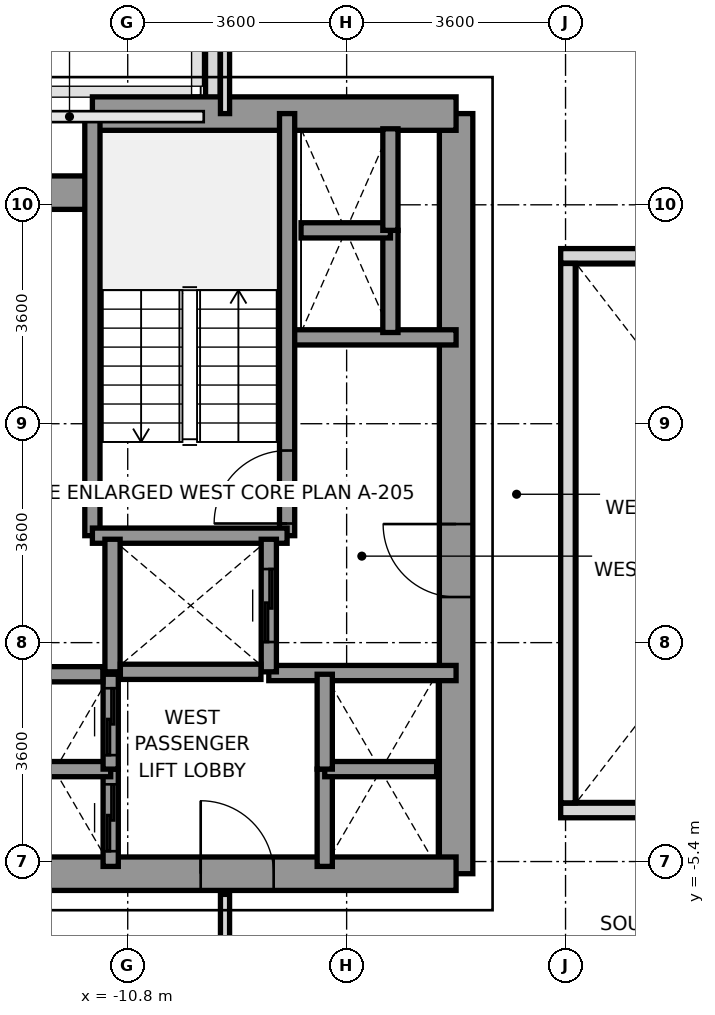
"""IFC4 building model, lengths in metres.
Left out: names, types, materials, properties, quantities, classifications, styles, units other than length and angle.
Written with IfcOpenShell. Run it as: python <this file> out.ifc"""

import sys

from ifc_helpers import new_model, si_unit, direction, frame, frame_2d, origin, place, context, subcontext, project, spatial, rectangle, extrude, source, transform, mapped, element, fill, save


model = new_model("IFC4")
c1 = context("Model", 3, precision=1e-05, world=origin(), true_north=direction((0.0, 1.0)))
c2 = subcontext(c1, "Body", "Model", "MODEL_VIEW")
j1 = project(units=[si_unit("LENGTHUNIT", "METRE"), si_unit("PLANEANGLEUNIT", "RADIAN")], contexts=[c1])
p1 = place(None, origin())
s1 = spatial("IfcSite", under=j1, at=p1, CompositionType="ELEMENT")
p2 = place(p1, origin())
s2 = spatial("IfcBuilding", under=s1, at=p2, CompositionType="ELEMENT")
p3 = place(p2, frame((0.0, 0.0, 61.2)))
s3 = spatial("IfcBuildingStorey", under=s2, at=p3, CompositionType="ELEMENT", Elevation=61.2)
p4 = place(p3, frame((-9.4, 6.953, 0.0), z_axis=(0.0, 0.0, 1.0), x_axis=(0.0, 1.0, 0.0)))
e1 = element("IfcWall", 1, at=p4, inside=s3, PredefinedType="PARAPET", context=c2, shape_type="SweptSolid", body=[
    extrude(rectangle(XDim=1.444, YDim=0.24, at=frame_2d((0.722, 0.0))), origin(), (0.0, 0.0, 1.0), 1.15),
])
p5 = place(p3, frame((-5.4, -5.6, 0.0), z_axis=(0.0, 0.0, 1.0), x_axis=(0.0, 1.0, 0.0)))
e2 = element("IfcWall", 2, at=p5, inside=s3, PredefinedType="SHEAR", context=c2, shape_type="SweptSolid", body=[
    extrude(rectangle(XDim=12.5, YDim=0.55, at=frame_2d((6.25, 0.0))), origin(), (0.0, 0.0, 1.0), 3.2),
])
p6 = place(p5, frame((4.55, 0.0, 0.0)))
e3 = element("IfcOpeningElement", 3, at=p6, cuts=e2, PredefinedType="OPENING", context=c2, shape_type="SweptSolid", body=[
    extrude(rectangle(XDim=1.2, YDim=2.2, at=frame_2d((0.6, 1.1))), frame((0.0, 0.285, 0.0), z_axis=(0.0, -1.0, 0.0), x_axis=(1.0, 0.0, 0.0)), (0.0, 0.0, 1.0), 0.57),
])
p7 = place(p3, frame((-11.381, 6.9, 0.0), z_axis=(0.0, 0.0, 1.0), x_axis=(1.0, 0.0, 0.0)))
e4 = element("IfcWall", 4, at=p7, inside=s3, PredefinedType="SHEAR", context=c2, shape_type="SweptSolid", body=[
    extrude(rectangle(XDim=5.981, YDim=0.55, at=frame_2d((2.991, 0.0))), origin(), (0.0, 0.0, 1.0), 3.2),
])
p8 = place(p3, frame((-13.2, 5.6, 0.0), z_axis=(0.0, 0.0, 1.0), x_axis=(1.0, 0.0, 0.0)))
e5 = element("IfcWall", 5, at=p8, inside=s3, PredefinedType="SHEAR", context=c2, shape_type="SweptSolid", body=[
    extrude(rectangle(XDim=1.819, YDim=0.55, at=frame_2d((0.909, 0.0))), origin(), (0.0, 0.0, 1.0), 3.2),
])
p9 = place(p3, frame((-13.2, -5.6, 0.0), z_axis=(0.0, 0.0, 1.0), x_axis=(1.0, 0.0, 0.0)))
e6 = element("IfcWall", 6, at=p9, inside=s3, PredefinedType="SHEAR", context=c2, shape_type="SweptSolid", body=[
    extrude(rectangle(XDim=7.8, YDim=0.55, at=frame_2d((3.9, 0.0))), origin(), (0.0, 0.0, 1.0), 3.2),
])
p10 = place(p9, frame((3.6, 0.0, 0.0)))
e7 = element("IfcOpeningElement", 7, at=p10, cuts=e6, PredefinedType="OPENING", context=c2, shape_type="SweptSolid", body=[
    extrude(rectangle(XDim=1.2, YDim=2.2, at=frame_2d((0.6, 1.1))), frame((0.0, 0.285, 0.0), z_axis=(0.0, -1.0, 0.0), x_axis=(1.0, 0.0, 0.0)), (0.0, 0.0, 1.0), 0.57),
])
p11 = place(p3, frame((-8.18, 3.22, 0.0), z_axis=(0.0, 0.0, 1.0), x_axis=(1.0, 0.0, 0.0)))
e8 = element("IfcWall", 8, at=p11, inside=s3, PredefinedType="SOLIDWALL", context=c2, shape_type="SweptSolid", body=[
    extrude(rectangle(XDim=2.78, YDim=0.25, at=frame_2d((1.39, 0.0))), origin(), (0.0, 0.0, 1.0), 3.2),
])
p12 = place(p3, frame((-8.48, -2.3, 0.0), z_axis=(0.0, 0.0, 1.0), x_axis=(1.0, 0.0, 0.0)))
e9 = element("IfcWall", 9, at=p12, inside=s3, PredefinedType="SOLIDWALL", context=c2, shape_type="SweptSolid", body=[
    extrude(rectangle(XDim=3.08, YDim=0.25, at=frame_2d((1.54, 0.0))), origin(), (0.0, 0.0, 1.0), 3.2),
])
p13 = place(p3, frame((-8.179, -0.041, 0.0), z_axis=(0.0, 0.0, 1.0), x_axis=(0.0, 1.0, 0.0)))
e10 = element("IfcWall", 10, at=p13, inside=s3, PredefinedType="SOLIDWALL", context=c2, shape_type="SweptSolid", body=[
    extrude(rectangle(XDim=6.941, YDim=0.25, at=frame_2d((3.47, 0.0))), origin(), (0.0, 0.0, 1.0), 3.2),
])
p14 = place(p13, frame((0.2, 0.0, 0.0)))
e11 = element("IfcOpeningElement", 11, at=p14, cuts=e10, PredefinedType="OPENING", context=c2, shape_type="SweptSolid", body=[
    extrude(rectangle(XDim=1.2, YDim=2.2, at=frame_2d((0.6, 1.1))), frame((0.0, 0.135, 0.0), z_axis=(0.0, -1.0, 0.0), x_axis=(1.0, 0.0, 0.0)), (0.0, 0.0, 1.0), 0.27),
])
p15 = place(p3, frame((-11.381, -0.041, 0.0), z_axis=(0.0, 0.0, 1.0), x_axis=(0.0, 1.0, 0.0)))
e12 = element("IfcWall", 12, at=p15, inside=s3, PredefinedType="SOLIDWALL", context=c2, shape_type="SweptSolid", body=[
    extrude(rectangle(XDim=6.941, YDim=0.25, at=frame_2d((3.47, 0.0))), origin(), (0.0, 0.0, 1.0), 3.2),
])
p16 = place(p3, frame((-11.381, -0.041, 0.0), z_axis=(0.0, 0.0, 1.0), x_axis=(1.0, 0.0, 0.0)))
e13 = element("IfcWall", 13, at=p16, inside=s3, PredefinedType="SOLIDWALL", context=c2, shape_type="SweptSolid", body=[
    extrude(rectangle(XDim=3.202, YDim=0.25, at=frame_2d((1.601, 0.0))), origin(), (0.0, 0.0, 1.0), 3.2),
])
p17 = place(p3, frame((-11.05, -2.28, 0.0), z_axis=(0.0, 0.0, 1.0), x_axis=(0.0, 1.0, 0.0)))
e14 = element("IfcWall", 14, at=p17, inside=s3, PredefinedType="SOLIDWALL", context=c2, shape_type="SweptSolid", body=[
    extrude(rectangle(XDim=2.18, YDim=0.25, at=frame_2d((1.09, 0.0))), origin(), (0.0, 0.0, 1.0), 3.2),
])
p18 = place(p3, frame((-8.48, -2.28, 0.0), z_axis=(0.0, 0.0, 1.0), x_axis=(0.0, 1.0, 0.0)))
e15 = element("IfcWall", 15, at=p18, inside=s3, PredefinedType="SOLIDWALL", context=c2, shape_type="SweptSolid", body=[
    extrude(rectangle(XDim=2.18, YDim=0.25, at=frame_2d((1.09, 0.0))), origin(), (0.0, 0.0, 1.0), 3.2),
])
p19 = place(p18, frame((0.49, 0.0, 0.0)))
e16 = element("IfcOpeningElement", 16, at=p19, cuts=e15, PredefinedType="OPENING", context=c2, shape_type="SweptSolid", body=[
    extrude(rectangle(XDim=1.2, YDim=2.2, at=frame_2d((0.6, 1.1))), frame((0.0, 0.135, 0.0), z_axis=(0.0, -1.0, 0.0), x_axis=(1.0, 0.0, 0.0)), (0.0, 0.0, 1.0), 0.27),
])
p20 = place(p3, frame((-10.921, -2.28, 0.0), z_axis=(0.0, 0.0, 1.0), x_axis=(1.0, 0.0, 0.0)))
e17 = element("IfcWall", 17, at=p20, inside=s3, PredefinedType="SOLIDWALL", context=c2, shape_type="SweptSolid", body=[
    extrude(rectangle(XDim=2.312, YDim=0.25, at=frame_2d((1.156, 0.0))), origin(), (0.0, 0.0, 1.0), 3.2),
])
p21 = place(p3, frame((-11.08, -5.48, 0.0), z_axis=(0.0, 0.0, 1.0), x_axis=(0.0, 1.0, 0.0)))
e18 = element("IfcWall", 18, at=p21, inside=s3, PredefinedType="SOLIDWALL", context=c2, shape_type="SweptSolid", body=[
    extrude(rectangle(XDim=1.6, YDim=0.25, at=frame_2d((0.8, 0.0))), origin(), (0.0, 0.0, 1.0), 3.2),
])
p22 = place(p21, frame((0.25, 0.0, 0.0)))
e19 = element("IfcOpeningElement", 19, at=p22, cuts=e18, PredefinedType="OPENING", context=c2, shape_type="SweptSolid", body=[
    extrude(rectangle(XDim=1.1, YDim=2.2, at=frame_2d((0.55, 1.1))), frame((0.0, 0.135, 0.0), z_axis=(0.0, -1.0, 0.0), x_axis=(1.0, 0.0, 0.0)), (0.0, 0.0, 1.0), 0.27),
])
p23 = place(p3, frame((-12.92, -3.88, 0.0), z_axis=(0.0, 0.0, 1.0), x_axis=(1.0, 0.0, 0.0)))
e20 = element("IfcWall", 20, at=p23, inside=s3, PredefinedType="SOLIDWALL", context=c2, shape_type="SweptSolid", body=[
    extrude(rectangle(XDim=1.84, YDim=0.25, at=frame_2d((0.92, 0.0))), origin(), (0.0, 0.0, 1.0), 3.2),
])
p24 = place(p3, frame((-11.08, -3.88, 0.0), z_axis=(0.0, 0.0, 1.0), x_axis=(0.0, 1.0, 0.0)))
e21 = element("IfcWall", 21, at=p24, inside=s3, PredefinedType="SOLIDWALL", context=c2, shape_type="SweptSolid", body=[
    extrude(rectangle(XDim=1.56, YDim=0.25, at=frame_2d((0.78, 0.0))), origin(), (0.0, 0.0, 1.0), 3.2),
])
p25 = place(p24, frame((0.23, 0.0, 0.0)))
e22 = element("IfcOpeningElement", 22, at=p25, cuts=e21, PredefinedType="OPENING", context=c2, shape_type="SweptSolid", body=[
    extrude(rectangle(XDim=1.1, YDim=2.2, at=frame_2d((0.55, 1.1))), frame((0.0, 0.135, 0.0), z_axis=(0.0, -1.0, 0.0), x_axis=(1.0, 0.0, 0.0)), (0.0, 0.0, 1.0), 0.27),
])
p26 = place(p3, frame((-12.791, -2.32, 0.0), z_axis=(0.0, 0.0, 1.0), x_axis=(1.0, 0.0, 0.0)))
e23 = element("IfcWall", 23, at=p26, inside=s3, PredefinedType="SOLIDWALL", context=c2, shape_type="SweptSolid", body=[
    extrude(rectangle(XDim=1.582, YDim=0.25, at=frame_2d((0.791, 0.0))), origin(), (0.0, 0.0, 1.0), 3.2),
])
p27 = place(p3, frame((-7.56, -5.48, 0.0), z_axis=(0.0, 0.0, 1.0), x_axis=(0.0, 1.0, 0.0)))
e24 = element("IfcWall", 24, at=p27, inside=s3, PredefinedType="SOLIDWALL", context=c2, shape_type="SweptSolid", body=[
    extrude(rectangle(XDim=1.6, YDim=0.25, at=frame_2d((0.8, 0.0))), origin(), (0.0, 0.0, 1.0), 3.2),
])
p28 = place(p3, frame((-7.56, -3.88, 0.0), z_axis=(0.0, 0.0, 1.0), x_axis=(1.0, 0.0, 0.0)))
e25 = element("IfcWall", 25, at=p28, inside=s3, PredefinedType="SOLIDWALL", context=c2, shape_type="SweptSolid", body=[
    extrude(rectangle(XDim=1.84, YDim=0.25, at=frame_2d((0.92, 0.0))), origin(), (0.0, 0.0, 1.0), 3.2),
])
p29 = place(p3, frame((-7.56, -3.88, 0.0), z_axis=(0.0, 0.0, 1.0), x_axis=(0.0, 1.0, 0.0)))
e26 = element("IfcWall", 26, at=p29, inside=s3, PredefinedType="SOLIDWALL", context=c2, shape_type="SweptSolid", body=[
    extrude(rectangle(XDim=1.56, YDim=0.25, at=frame_2d((0.78, 0.0))), origin(), (0.0, 0.0, 1.0), 3.2),
])
p30 = place(p3, frame((-6.48, 3.3, 0.0), z_axis=(0.0, 0.0, 1.0), x_axis=(0.0, 1.0, 0.0)))
e27 = element("IfcWall", 27, at=p30, inside=s3, PredefinedType="SOLIDWALL", context=c2, shape_type="SweptSolid", body=[
    extrude(rectangle(XDim=1.68, YDim=0.25, at=frame_2d((0.84, 0.0))), origin(), (0.0, 0.0, 1.0), 3.2),
])
p31 = place(p3, frame((-7.95, 4.98, 0.0), z_axis=(0.0, 0.0, 1.0), x_axis=(1.0, 0.0, 0.0)))
e28 = element("IfcWall", 28, at=p31, inside=s3, PredefinedType="SOLIDWALL", context=c2, shape_type="SweptSolid", body=[
    extrude(rectangle(XDim=1.47, YDim=0.25, at=frame_2d((0.735, 0.0))), origin(), (0.0, 0.0, 1.0), 3.2),
])
p32 = place(p3, frame((-6.48, 4.98, 0.0), z_axis=(0.0, 0.0, 1.0), x_axis=(0.0, 1.0, 0.0)))
e29 = element("IfcWall", 29, at=p32, inside=s3, PredefinedType="SOLIDWALL", context=c2, shape_type="SweptSolid", body=[
    extrude(rectangle(XDim=1.67, YDim=0.25, at=frame_2d((0.835, 0.0))), origin(), (0.0, 0.0, 1.0), 3.2),
])
p33 = place(p3, frame((-9.2, 6.9, 0.0), z_axis=(0.0, 0.0, 1.0), x_axis=(0.0, 1.0, 0.0)))
e30 = element("IfcWall", 30, at=p33, inside=s3, PredefinedType="PARTITIONING", context=c2, shape_type="SweptSolid", body=[
    extrude(rectangle(XDim=8.78, YDim=0.15, at=frame_2d((4.39, 0.0))), origin(), (0.0, 0.0, 1.0), 2.71),
])
p34 = place(p3, frame((-9.2, -15.68, 0.0), z_axis=(0.0, 0.0, 1.0), x_axis=(0.0, 1.0, 0.0)))
e31 = element("IfcWall", 31, at=p34, inside=s3, PredefinedType="PARTITIONING", context=c2, shape_type="SweptSolid", body=[
    extrude(rectangle(XDim=9.74, YDim=0.15, at=frame_2d((4.87, 0.0))), origin(), (0.0, 0.0, 1.0), 2.71),
])
for number, where, z_axis, x_axis in (
    (32, (-3.68, -4.56, 0.0), (0.0, 0.0, 1.0), (1.0, 0.0, 0.0)),
    (33, (-3.68, 4.56, 0.0), (0.0, 0.0, 1.0), (1.0, 0.0, 0.0)),
):
    element("IfcWall", number, at=place(p3, frame(where, z_axis=z_axis, x_axis=x_axis)), inside=s3, PredefinedType="PARAPET", context=c2, shape_type="SweptSolid", body=[
        extrude(rectangle(XDim=7.36, YDim=0.24, at=frame_2d((3.68, 0.0))), origin(), (0.0, 0.0, 1.0), 1.15),
    ])
p35 = place(p3, frame((-3.56, -4.435, 0.0), z_axis=(0.0, 0.0, 1.0), x_axis=(0.0, 1.0, 0.0)))
e34 = element("IfcWall", 34, at=p35, inside=s3, PredefinedType="PARAPET", context=c2, shape_type="SweptSolid", body=[
    extrude(rectangle(XDim=8.87, YDim=0.24, at=frame_2d((4.435, 0.0))), origin(), (0.0, 0.0, 1.0), 1.15),
])
m1 = source(origin(), c2, "Body", "SweptSolid", [
    extrude(rectangle(XDim=1.2, YDim=2.2, at=frame_2d((0.6, 1.1))), frame((0.0, 0.025, 0.0), z_axis=(0.0, -1.0, 0.0), x_axis=(1.0, 0.0, 0.0)), (0.0, 0.0, 1.0), 0.05),
])
p36 = place(p14, origin())
e35 = element("IfcDoor", 35, at=p36, inside=s3, OperationType="SINGLE_SWING_LEFT", PredefinedType="DOOR", context=c2, shape_type="MappedRepresentation", body=[
    mapped(m1, transform((0.0, 0.0, 0.0), x_axis=(1.0, 0.0, 0.0), y_axis=(0.0, 1.0, 0.0), z_axis=(0.0, 0.0, 1.0), scale=1.0)),
])
fill(e11, e35)
p37 = place(p6, origin())
e36 = element("IfcDoor", 36, at=p37, inside=s3, OperationType="SINGLE_SWING_RIGHT", PredefinedType="DOOR", context=c2, shape_type="MappedRepresentation", body=[
    mapped(m1, transform((0.0, 0.0, 0.0), x_axis=(1.0, 0.0, 0.0), y_axis=(0.0, 1.0, 0.0), z_axis=(0.0, 0.0, 1.0), scale=1.0)),
])
fill(e3, e36)
p38 = place(p10, origin())
e37 = element("IfcDoor", 37, at=p38, inside=s3, OperationType="SINGLE_SWING_LEFT", PredefinedType="DOOR", context=c2, shape_type="MappedRepresentation", body=[
    mapped(m1, transform((0.0, 0.0, 0.0), x_axis=(1.0, 0.0, 0.0), y_axis=(0.0, 1.0, 0.0), z_axis=(0.0, 0.0, 1.0), scale=1.0)),
])
fill(e7, e37)
p39 = place(p19, origin())
e38 = element("IfcDoor", 38, at=p39, inside=s3, OperationType="SLIDING_TO_RIGHT", PredefinedType="DOOR", context=c2, shape_type="MappedRepresentation", body=[
    mapped(m1, transform((0.0, 0.0, 0.0), x_axis=(1.0, 0.0, 0.0), y_axis=(0.0, 1.0, 0.0), z_axis=(0.0, 0.0, 1.0), scale=1.0)),
])
fill(e16, e38)
m2 = source(origin(), c2, "Body", "SweptSolid", [
    extrude(rectangle(XDim=1.1, YDim=2.2, at=frame_2d((0.55, 1.1))), frame((0.0, 0.025, 0.0), z_axis=(0.0, -1.0, 0.0), x_axis=(1.0, 0.0, 0.0)), (0.0, 0.0, 1.0), 0.05),
])
p40 = place(p22, origin())
e39 = element("IfcDoor", 39, at=p40, inside=s3, OperationType="SLIDING_TO_LEFT", PredefinedType="DOOR", context=c2, shape_type="MappedRepresentation", body=[
    mapped(m2, transform((0.0, 0.0, 0.0), x_axis=(1.0, 0.0, 0.0), y_axis=(0.0, 1.0, 0.0), z_axis=(0.0, 0.0, 1.0), scale=1.0)),
])
fill(e19, e39)
p41 = place(p25, origin())
e40 = element("IfcDoor", 40, at=p41, inside=s3, OperationType="SLIDING_TO_LEFT", PredefinedType="DOOR", context=c2, shape_type="MappedRepresentation", body=[
    mapped(m2, transform((0.0, 0.0, 0.0), x_axis=(1.0, 0.0, 0.0), y_axis=(0.0, 1.0, 0.0), z_axis=(0.0, 0.0, 1.0), scale=1.0)),
])
fill(e22, e40)
save(model, sys.argv[1])
